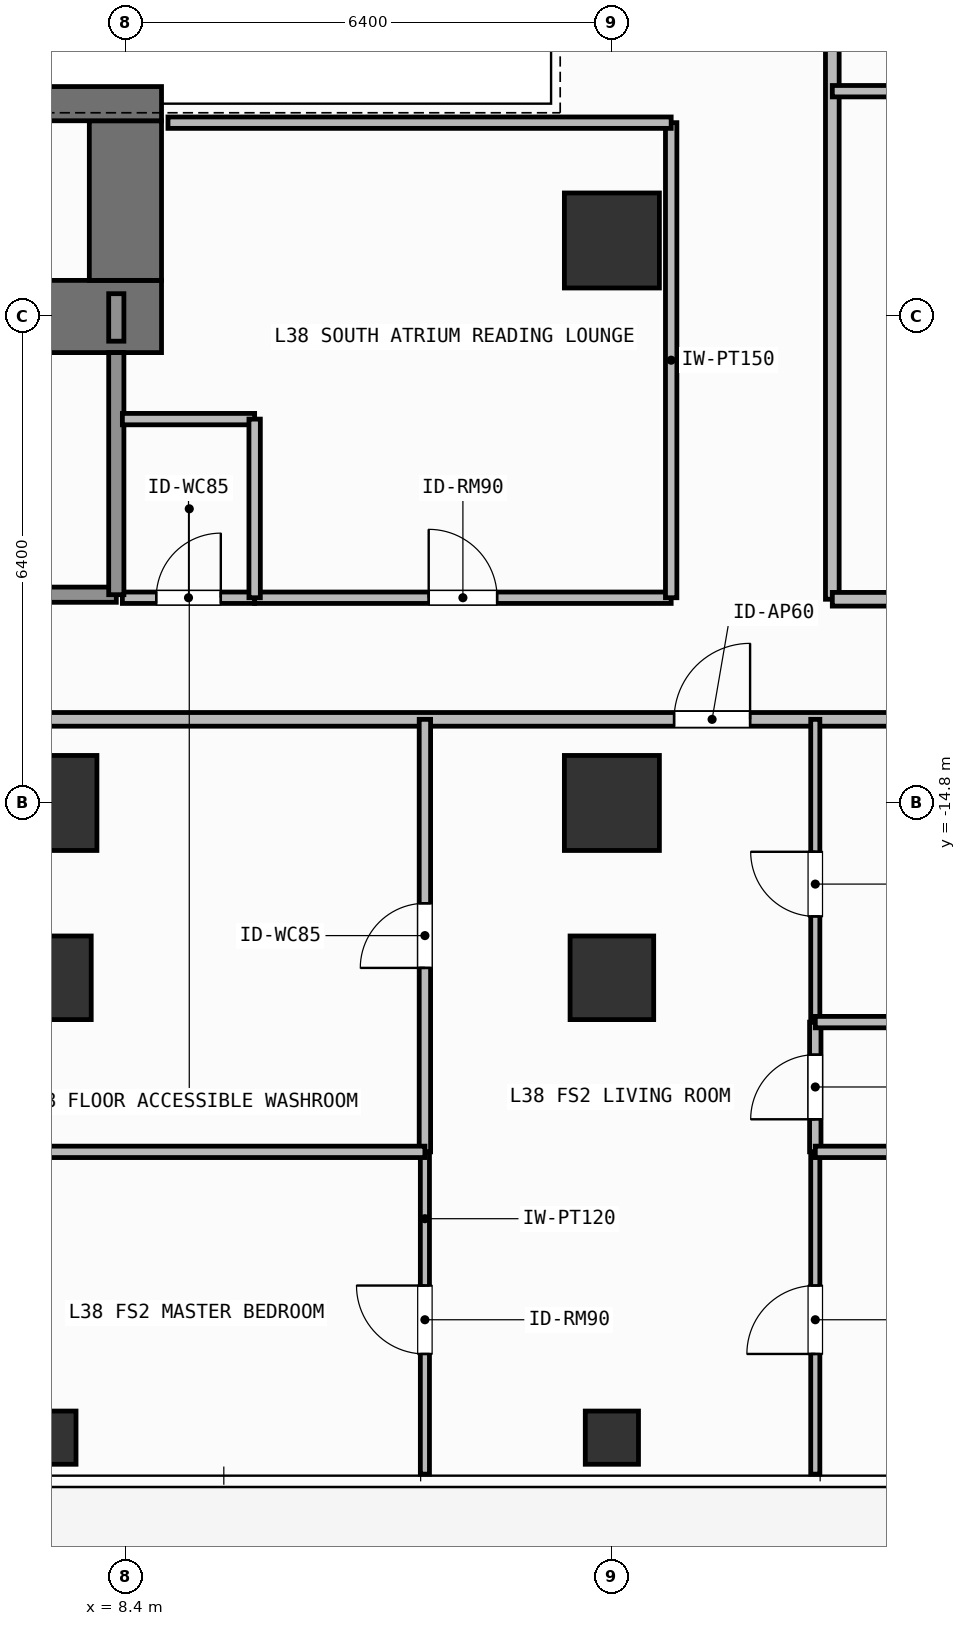
"""IFC4 building model, lengths in metres.
Left out: names, types, materials, properties, quantities, classifications, styles, units other than length and angle.
Written with IfcOpenShell. Run it as: python <this file> out.ifc"""

import sys

from ifc_helpers import new_model, si_unit, direction, frame, frame_2d, origin, origin_2d, place, context, subcontext, project, spatial, rectangle, hollow_rectangle, extrude, element, fill, save


model = new_model("IFC4")
c1 = context("Model", 3, precision=1e-05, world=origin(), true_north=direction((0.0, 1.0)))
c2 = subcontext(c1, "Body", "Model", "MODEL_VIEW")
j1 = project(units=[si_unit("LENGTHUNIT", "METRE"), si_unit("PLANEANGLEUNIT", "RADIAN")], contexts=[c1])
p1 = place(None, origin())
s1 = spatial("IfcSite", under=j1, at=p1, CompositionType="ELEMENT")
p2 = place(p1, origin())
s2 = spatial("IfcBuilding", under=s1, at=p2, CompositionType="ELEMENT")
p3 = place(p2, frame((0.0, 0.0, 152.4)))
s3 = spatial("IfcBuildingStorey", under=s2, at=p3, CompositionType="ELEMENT", Elevation=152.4)
p4 = place(p3, frame((6.12, -8.4, 0.0), z_axis=(0.0, 0.0, 1.0), x_axis=(1.0, 0.0, 0.0)))
e1 = element("IfcWall", 1, at=p4, inside=s3, PredefinedType="SHEAR", context=c2, shape_type="SweptSolid", body=[
    extrude(rectangle(XDim=2.755, YDim=0.95, at=frame_2d((1.377, 0.0))), origin(), (0.0, 0.0, 1.0), 3.9),
])
p5 = place(p3, frame((8.4, -7.925, 0.0), z_axis=(0.0, 0.0, 1.0), x_axis=(0.0, 1.0, 0.0)))
e2 = element("IfcWall", 2, at=p5, inside=s3, PredefinedType="SHEAR", context=c2, shape_type="SweptSolid", body=[
    extrude(rectangle(XDim=2.1, YDim=0.95, at=frame_2d((1.05, 0.0))), origin(), (0.0, 0.0, 1.0), 3.9),
])
p6 = place(p3, frame((3.045, -5.6, 0.0), z_axis=(0.0, 0.0, 1.0), x_axis=(1.0, 0.0, 0.0)))
e3 = element("IfcWall", 3, at=p6, inside=s3, PredefinedType="SHEAR", context=c2, shape_type="SweptSolid", body=[
    extrude(rectangle(XDim=5.83, YDim=0.45, at=frame_2d((2.915, 0.0))), origin(), (0.0, 0.0, 1.0), 3.9),
])
for number, where, z_axis, x_axis in (
    (4, (7.4, -14.8, 0.0), (0.0, 0.0, 1.0), (1.0, 0.0, 0.0)),
    (5, (14.8, -14.8, 0.0), (0.0, 0.0, 1.0), (1.0, 0.0, 0.0)),
    (6, (14.8, -7.4, 0.0), (0.0, 0.0, 1.0), (1.0, 0.0, 0.0)),
):
    element("IfcColumn", number, at=place(p3, frame(where, z_axis=z_axis, x_axis=x_axis)), inside=s3, PredefinedType="COLUMN", context=c2, shape_type="SweptSolid", body=[
        extrude(rectangle(XDim=1.25, YDim=1.25, at=origin_2d()), origin(), (0.0, 0.0, 1.0), 3.9),
    ])
for number, where, z_axis, x_axis in (
    (7, (7.4, -17.1, 0.0), (0.0, 0.0, 1.0), (1.0, 0.0, 0.0)),
    (8, (14.8, -17.1, 0.0), (0.0, 0.0, 1.0), (1.0, 0.0, 0.0)),
):
    element("IfcColumn", number, at=place(p3, frame(where, z_axis=z_axis, x_axis=x_axis)), inside=s3, PredefinedType="COLUMN", context=c2, shape_type="SweptSolid", body=[
        extrude(rectangle(XDim=1.1, YDim=1.1, at=origin_2d()), origin(), (0.0, 0.0, 1.0), 3.9),
    ])
for number, where, z_axis, x_axis in (
    (9, (7.4, -23.15, 0.0), (0.0, 0.0, 1.0), (1.0, 0.0, 0.0)),
    (10, (14.8, -23.15, 0.0), (0.0, 0.0, 1.0), (1.0, 0.0, 0.0)),
):
    element("IfcColumn", number, at=place(p3, frame(where, z_axis=z_axis, x_axis=x_axis)), inside=s3, PredefinedType="COLUMN", context=c2, shape_type="SweptSolid", body=[
        extrude(hollow_rectangle(XDim=0.7, YDim=0.7, WallThickness=0.032, at=origin_2d()), origin(), (0.0, 0.0, 1.0), 3.9),
    ])
p7 = place(p3, frame((4.58, -12.06, 0.0), z_axis=(0.0, 0.0, 1.0), x_axis=(1.0, 0.0, 0.0)))
e11 = element("IfcWall", 11, at=p7, inside=s3, PredefinedType="SOLIDWALL", context=c2, shape_type="SweptSolid", body=[
    extrude(rectangle(XDim=3.7, YDim=0.2, at=frame_2d((1.85, 0.0))), origin(), (0.0, 0.0, 1.0), 3.6),
])
p8 = place(p7, frame((1.212, 0.0, 0.0)))
e12 = element("IfcOpeningElement", 12, at=p8, cuts=e11, PredefinedType="OPENING", context=c2, shape_type="SweptSolid", body=[
    extrude(rectangle(XDim=1.1, YDim=2.15, at=frame_2d((0.55, 1.075))), frame((0.0, 0.11, 0.0), z_axis=(0.0, -1.0, 0.0), x_axis=(1.0, 0.0, 0.0)), (0.0, 0.0, 1.0), 0.22),
])
p9 = place(p3, frame((8.36, -12.1, 0.0), z_axis=(0.0, 0.0, 1.0), x_axis=(1.0, 0.0, 0.0)))
e13 = element("IfcWall", 13, at=p9, inside=s3, PredefinedType="PARTITIONING", context=c2, shape_type="SweptSolid", body=[
    extrude(rectangle(XDim=1.74, YDim=0.15, at=frame_2d((0.87, 0.0))), origin(), (0.0, 0.0, 1.0), 3.6),
])
p10 = place(p9, frame((0.445, 0.0, 0.0)))
e14 = element("IfcOpeningElement", 14, at=p10, cuts=e13, PredefinedType="OPENING", context=c2, shape_type="SweptSolid", body=[
    extrude(rectangle(XDim=0.85, YDim=2.1, at=frame_2d((0.425, 1.05))), frame((0.0, 0.085, 0.0), z_axis=(0.0, -1.0, 0.0), x_axis=(1.0, 0.0, 0.0)), (0.0, 0.0, 1.0), 0.17),
])
p11 = place(p3, frame((10.1, -12.1, 0.0), z_axis=(0.0, 0.0, 1.0), x_axis=(1.0, 0.0, 0.0)))
e15 = element("IfcWall", 15, at=p11, inside=s3, PredefinedType="PARTITIONING", context=c2, shape_type="SweptSolid", body=[
    extrude(rectangle(XDim=5.48, YDim=0.15, at=frame_2d((2.74, 0.0))), origin(), (0.0, 0.0, 1.0), 3.6),
])
p12 = place(p11, frame((2.29, 0.0, 0.0)))
e16 = element("IfcOpeningElement", 16, at=p12, cuts=e15, PredefinedType="OPENING", context=c2, shape_type="SweptSolid", body=[
    extrude(rectangle(XDim=0.9, YDim=2.1, at=frame_2d((0.45, 1.05))), frame((0.0, 0.085, 0.0), z_axis=(0.0, -1.0, 0.0), x_axis=(1.0, 0.0, 0.0)), (0.0, 0.0, 1.0), 0.17),
])
p13 = place(p3, frame((6.326, -13.7, 0.0), z_axis=(0.0, 0.0, 1.0), x_axis=(1.0, 0.0, 0.0)))
e17 = element("IfcWall", 17, at=p13, inside=s3, PredefinedType="PARTITIONING", context=c2, shape_type="SweptSolid", body=[
    extrude(rectangle(XDim=17.794, YDim=0.18, at=frame_2d((8.897, 0.0))), origin(), (0.0, 0.0, 1.0), 3.6),
])
p14 = place(p13, frame((9.292, 0.0, 0.0)))
e18 = element("IfcOpeningElement", 18, at=p14, cuts=e17, PredefinedType="OPENING", context=c2, shape_type="SweptSolid", body=[
    extrude(rectangle(XDim=1.0, YDim=2.2, at=frame_2d((0.5, 1.1))), frame((0.0, 0.1, 0.0), z_axis=(0.0, -1.0, 0.0), x_axis=(1.0, 0.0, 0.0)), (0.0, 0.0, 1.0), 0.2),
])
p15 = place(p3, frame((12.34, -19.39, 0.0), z_axis=(0.0, 0.0, 1.0), x_axis=(0.0, 1.0, 0.0)))
e19 = element("IfcWall", 19, at=p15, inside=s3, PredefinedType="PARTITIONING", context=c2, shape_type="SweptSolid", body=[
    extrude(rectangle(XDim=5.69, YDim=0.15, at=frame_2d((2.845, 0.0))), origin(), (0.0, 0.0, 1.0), 3.6),
])
p16 = place(p15, frame((2.42, 0.0, 0.0)))
e20 = element("IfcOpeningElement", 20, at=p16, cuts=e19, PredefinedType="OPENING", context=c2, shape_type="SweptSolid", body=[
    extrude(rectangle(XDim=0.85, YDim=2.1, at=frame_2d((0.425, 1.05))), frame((0.0, 0.085, 0.0), z_axis=(0.0, -1.0, 0.0), x_axis=(1.0, 0.0, 0.0)), (0.0, 0.0, 1.0), 0.17),
])
p17 = place(p3, frame((12.34, -23.63, 0.0), z_axis=(0.0, 0.0, 1.0), x_axis=(0.0, 1.0, 0.0)))
e21 = element("IfcWall", 21, at=p17, inside=s3, PredefinedType="PARTITIONING", context=c2, shape_type="SweptSolid", body=[
    extrude(rectangle(XDim=4.24, YDim=0.12, at=frame_2d((2.12, 0.0))), origin(), (0.0, 0.0, 1.0), 3.6),
])
p18 = place(p17, frame((1.581, 0.0, 0.0)))
e22 = element("IfcOpeningElement", 22, at=p18, cuts=e21, PredefinedType="OPENING", context=c2, shape_type="SweptSolid", body=[
    extrude(rectangle(XDim=0.9, YDim=2.1, at=frame_2d((0.45, 1.05))), frame((0.0, 0.07, 0.0), z_axis=(0.0, -1.0, 0.0), x_axis=(1.0, 0.0, 0.0)), (0.0, 0.0, 1.0), 0.14),
])
p19 = place(p3, frame((17.476, -19.39, 0.0), z_axis=(0.0, 0.0, 1.0), x_axis=(0.0, 1.0, 0.0)))
e23 = element("IfcWall", 23, at=p19, inside=s3, PredefinedType="PARTITIONING", context=c2, shape_type="SweptSolid", body=[
    extrude(rectangle(XDim=1.707, YDim=0.15, at=frame_2d((0.854, 0.0))), origin(), (0.0, 0.0, 1.0), 3.6),
])
p20 = place(p19, frame((0.428, 0.0, 0.0)))
e24 = element("IfcOpeningElement", 24, at=p20, cuts=e23, PredefinedType="OPENING", context=c2, shape_type="SweptSolid", body=[
    extrude(rectangle(XDim=0.85, YDim=2.1, at=frame_2d((0.425, 1.05))), frame((0.0, 0.085, 0.0), z_axis=(0.0, -1.0, 0.0), x_axis=(1.0, 0.0, 0.0)), (0.0, 0.0, 1.0), 0.17),
])
p21 = place(p3, frame((17.476, -17.683, 0.0), z_axis=(0.0, 0.0, 1.0), x_axis=(0.0, 1.0, 0.0)))
e25 = element("IfcWall", 25, at=p21, inside=s3, PredefinedType="PARTITIONING", context=c2, shape_type="SweptSolid", body=[
    extrude(rectangle(XDim=3.983, YDim=0.12, at=frame_2d((1.992, 0.0))), origin(), (0.0, 0.0, 1.0), 3.6),
])
p22 = place(p21, frame((1.391, 0.0, 0.0)))
e26 = element("IfcOpeningElement", 26, at=p22, cuts=e25, PredefinedType="OPENING", context=c2, shape_type="SweptSolid", body=[
    extrude(rectangle(XDim=0.85, YDim=2.1, at=frame_2d((0.425, 1.05))), frame((0.0, 0.07, 0.0), z_axis=(0.0, -1.0, 0.0), x_axis=(1.0, 0.0, 0.0)), (0.0, 0.0, 1.0), 0.14),
])
p23 = place(p3, frame((17.476, -23.63, 0.0), z_axis=(0.0, 0.0, 1.0), x_axis=(0.0, 1.0, 0.0)))
e27 = element("IfcWall", 27, at=p23, inside=s3, PredefinedType="PARTITIONING", context=c2, shape_type="SweptSolid", body=[
    extrude(rectangle(XDim=4.24, YDim=0.12, at=frame_2d((2.12, 0.0))), origin(), (0.0, 0.0, 1.0), 3.6),
])
p24 = place(p23, frame((1.581, 0.0, 0.0)))
e28 = element("IfcOpeningElement", 28, at=p24, cuts=e27, PredefinedType="OPENING", context=c2, shape_type="SweptSolid", body=[
    extrude(rectangle(XDim=0.9, YDim=2.1, at=frame_2d((0.45, 1.05))), frame((0.0, 0.07, 0.0), z_axis=(0.0, -1.0, 0.0), x_axis=(1.0, 0.0, 0.0)), (0.0, 0.0, 1.0), 0.14),
])
p25 = place(p3, frame((17.7, -12.12, 0.0), z_axis=(0.0, 0.0, 1.0), x_axis=(0.0, 1.0, 0.0)))
e29 = element("IfcWall", 29, at=p25, inside=s3, PredefinedType="PARTITIONING", context=c2, shape_type="SweptSolid", body=[
    extrude(rectangle(XDim=24.24, YDim=0.18, at=frame_2d((12.12, 0.0))), origin(), (0.0, 0.0, 1.0), 3.6),
])
p26 = place(p25, frame((11.62, 0.0, 0.0)))
e30 = element("IfcOpeningElement", 30, at=p26, cuts=e29, PredefinedType="OPENING", context=c2, shape_type="SweptSolid", body=[
    extrude(rectangle(XDim=1.0, YDim=2.2, at=frame_2d((0.5, 1.1))), frame((0.0, 0.1, 0.0), z_axis=(0.0, -1.0, 0.0), x_axis=(1.0, 0.0, 0.0)), (0.0, 0.0, 1.0), 0.2),
])
p27 = place(p3, frame((17.7, -5.436, 0.0), z_axis=(0.0, 0.0, 1.0), x_axis=(1.0, 0.0, 0.0)))
e31 = element("IfcWall", 31, at=p27, inside=s3, PredefinedType="PARTITIONING", context=c2, shape_type="SweptSolid", body=[
    extrude(rectangle(XDim=5.59, YDim=0.15, at=frame_2d((2.795, 0.0))), origin(), (0.0, 0.0, 1.0), 3.6),
])
p28 = place(p27, frame((2.812, 0.0, 0.0)))
e32 = element("IfcOpeningElement", 32, at=p28, cuts=e31, PredefinedType="OPENING", context=c2, shape_type="SweptSolid", body=[
    extrude(rectangle(XDim=0.85, YDim=2.1, at=frame_2d((0.425, 1.05))), frame((0.0, 0.085, 0.0), z_axis=(0.0, -1.0, 0.0), x_axis=(1.0, 0.0, 0.0)), (0.0, 0.0, 1.0), 0.17),
])
p29 = place(p3, frame((8.28, -12.06, 0.0), z_axis=(0.0, 0.0, 1.0), x_axis=(0.0, 1.0, 0.0)))
e33 = element("IfcWall", 33, at=p29, inside=s3, PredefinedType="SOLIDWALL", context=c2, shape_type="SweptSolid", body=[
    extrude(rectangle(XDim=3.185, YDim=0.2, at=frame_2d((1.593, 0.0))), origin(), (0.0, 0.0, 1.0), 3.6),
])
p30 = place(p3, frame((8.28, -8.725, 0.0), z_axis=(0.0, 0.0, 1.0), x_axis=(0.0, 1.0, 0.0)))
e34 = element("IfcWall", 34, at=p30, inside=s3, PredefinedType="SOLIDWALL", context=c2, shape_type="SweptSolid", body=[
    extrude(rectangle(XDim=0.625, YDim=0.2, at=frame_2d((0.312, 0.0))), origin(), (0.0, 0.0, 1.0), 3.6),
])
p31 = place(p3, frame((8.36, -9.75, 0.0), z_axis=(0.0, 0.0, 1.0), x_axis=(1.0, 0.0, 0.0)))
e35 = element("IfcWall", 35, at=p31, inside=s3, PredefinedType="PARTITIONING", context=c2, shape_type="SweptSolid", body=[
    extrude(rectangle(XDim=1.74, YDim=0.15, at=frame_2d((0.87, 0.0))), origin(), (0.0, 0.0, 1.0), 3.6),
])
p32 = place(p3, frame((10.1, -12.1, 0.0), z_axis=(0.0, 0.0, 1.0), x_axis=(0.0, 1.0, 0.0)))
e36 = element("IfcWall", 36, at=p32, inside=s3, PredefinedType="PARTITIONING", context=c2, shape_type="SweptSolid", body=[
    extrude(rectangle(XDim=2.35, YDim=0.15, at=frame_2d((1.175, 0.0))), origin(), (0.0, 0.0, 1.0), 3.6),
])
p33 = place(p3, frame((15.58, -12.1, 0.0), z_axis=(0.0, 0.0, 1.0), x_axis=(0.0, 1.0, 0.0)))
e37 = element("IfcWall", 37, at=p33, inside=s3, PredefinedType="PARTITIONING", context=c2, shape_type="SweptSolid", body=[
    extrude(rectangle(XDim=6.25, YDim=0.15, at=frame_2d((3.125, 0.0))), origin(), (0.0, 0.0, 1.0), 3.6),
])
p34 = place(p3, frame((8.96, -5.85, 0.0), z_axis=(0.0, 0.0, 1.0), x_axis=(1.0, 0.0, 0.0)))
e38 = element("IfcWall", 38, at=p34, inside=s3, PredefinedType="PARTITIONING", context=c2, shape_type="SweptSolid", body=[
    extrude(rectangle(XDim=6.62, YDim=0.15, at=frame_2d((3.31, 0.0))), origin(), (0.0, 0.0, 1.0), 3.6),
])
p35 = place(p3, frame((6.326, -19.39, 0.0), z_axis=(0.0, 0.0, 1.0), x_axis=(1.0, 0.0, 0.0)))
e39 = element("IfcWall", 39, at=p35, inside=s3, PredefinedType="PARTITIONING", context=c2, shape_type="SweptSolid", body=[
    extrude(rectangle(XDim=6.014, YDim=0.15, at=frame_2d((3.007, 0.0))), origin(), (0.0, 0.0, 1.0), 3.6),
])
for number, where, z_axis, x_axis in (
    (40, (17.476, -17.683, 0.0), (0.0, 0.0, 1.0), (1.0, 0.0, 0.0)),
    (41, (17.476, -19.39, 0.0), (0.0, 0.0, 1.0), (1.0, 0.0, 0.0)),
):
    element("IfcWall", number, at=place(p3, frame(where, z_axis=z_axis, x_axis=x_axis)), inside=s3, PredefinedType="PARTITIONING", context=c2, shape_type="SweptSolid", body=[
        extrude(rectangle(XDim=6.644, YDim=0.15, at=frame_2d((3.322, 0.0))), origin(), (0.0, 0.0, 1.0), 3.6),
    ])
p36 = place(p3, frame((17.7, -12.12, 0.0), z_axis=(0.0, 0.0, 1.0), x_axis=(1.0, 0.0, 0.0)))
e42 = element("IfcWall", 42, at=p36, inside=s3, PredefinedType="PARTITIONING", context=c2, shape_type="SweptSolid", body=[
    extrude(rectangle(XDim=9.83, YDim=0.18, at=frame_2d((4.915, 0.0))), origin(), (0.0, 0.0, 1.0), 3.6),
])
p37 = place(p10, origin())
e43 = element("IfcDoor", 43, at=p37, inside=s3, OperationType="SINGLE_SWING_RIGHT", PredefinedType="DOOR", context=c2, shape_type="SweptSolid", body=[
    extrude(rectangle(XDim=0.85, YDim=2.1, at=frame_2d((0.425, 1.05))), frame((0.0, 0.025, 0.0), z_axis=(0.0, -1.0, 0.0), x_axis=(1.0, 0.0, 0.0)), (0.0, 0.0, 1.0), 0.05),
])
fill(e14, e43)
p38 = place(p12, origin())
e44 = element("IfcDoor", 44, at=p38, inside=s3, OperationType="SINGLE_SWING_LEFT", PredefinedType="DOOR", context=c2, shape_type="SweptSolid", body=[
    extrude(rectangle(XDim=0.9, YDim=2.1, at=frame_2d((0.45, 1.05))), frame((0.0, 0.025, 0.0), z_axis=(0.0, -1.0, 0.0), x_axis=(1.0, 0.0, 0.0)), (0.0, 0.0, 1.0), 0.05),
])
fill(e16, e44)
p39 = place(p14, origin())
e45 = element("IfcDoor", 45, at=p39, inside=s3, OperationType="SINGLE_SWING_RIGHT", PredefinedType="DOOR", context=c2, shape_type="SweptSolid", body=[
    extrude(rectangle(XDim=1.0, YDim=2.2, at=frame_2d((0.5, 1.1))), frame((0.0, 0.025, 0.0), z_axis=(0.0, -1.0, 0.0), x_axis=(1.0, 0.0, 0.0)), (0.0, 0.0, 1.0), 0.05),
])
fill(e18, e45)
p40 = place(p16, origin())
e46 = element("IfcDoor", 46, at=p40, inside=s3, OperationType="SINGLE_SWING_LEFT", PredefinedType="DOOR", context=c2, shape_type="SweptSolid", body=[
    extrude(rectangle(XDim=0.85, YDim=2.1, at=frame_2d((0.425, 1.05))), frame((0.0, 0.025, 0.0), z_axis=(0.0, -1.0, 0.0), x_axis=(1.0, 0.0, 0.0)), (0.0, 0.0, 1.0), 0.05),
])
fill(e20, e46)
p41 = place(p18, origin())
e47 = element("IfcDoor", 47, at=p41, inside=s3, OperationType="SINGLE_SWING_RIGHT", PredefinedType="DOOR", context=c2, shape_type="SweptSolid", body=[
    extrude(rectangle(XDim=0.9, YDim=2.1, at=frame_2d((0.45, 1.05))), frame((0.0, 0.025, 0.0), z_axis=(0.0, -1.0, 0.0), x_axis=(1.0, 0.0, 0.0)), (0.0, 0.0, 1.0), 0.05),
])
fill(e22, e47)
p42 = place(p20, origin())
e48 = element("IfcDoor", 48, at=p42, inside=s3, OperationType="SINGLE_SWING_LEFT", PredefinedType="DOOR", context=c2, shape_type="SweptSolid", body=[
    extrude(rectangle(XDim=0.85, YDim=2.1, at=frame_2d((0.425, 1.05))), frame((0.0, 0.025, 0.0), z_axis=(0.0, -1.0, 0.0), x_axis=(1.0, 0.0, 0.0)), (0.0, 0.0, 1.0), 0.05),
])
fill(e24, e48)
p43 = place(p22, origin())
e49 = element("IfcDoor", 49, at=p43, inside=s3, OperationType="SINGLE_SWING_RIGHT", PredefinedType="DOOR", context=c2, shape_type="SweptSolid", body=[
    extrude(rectangle(XDim=0.85, YDim=2.1, at=frame_2d((0.425, 1.05))), frame((0.0, 0.025, 0.0), z_axis=(0.0, -1.0, 0.0), x_axis=(1.0, 0.0, 0.0)), (0.0, 0.0, 1.0), 0.05),
])
fill(e26, e49)
p44 = place(p24, origin())
e50 = element("IfcDoor", 50, at=p44, inside=s3, OperationType="SINGLE_SWING_LEFT", PredefinedType="DOOR", context=c2, shape_type="SweptSolid", body=[
    extrude(rectangle(XDim=0.9, YDim=2.1, at=frame_2d((0.45, 1.05))), frame((0.0, 0.025, 0.0), z_axis=(0.0, -1.0, 0.0), x_axis=(1.0, 0.0, 0.0)), (0.0, 0.0, 1.0), 0.05),
])
fill(e28, e50)
save(model, sys.argv[1])
